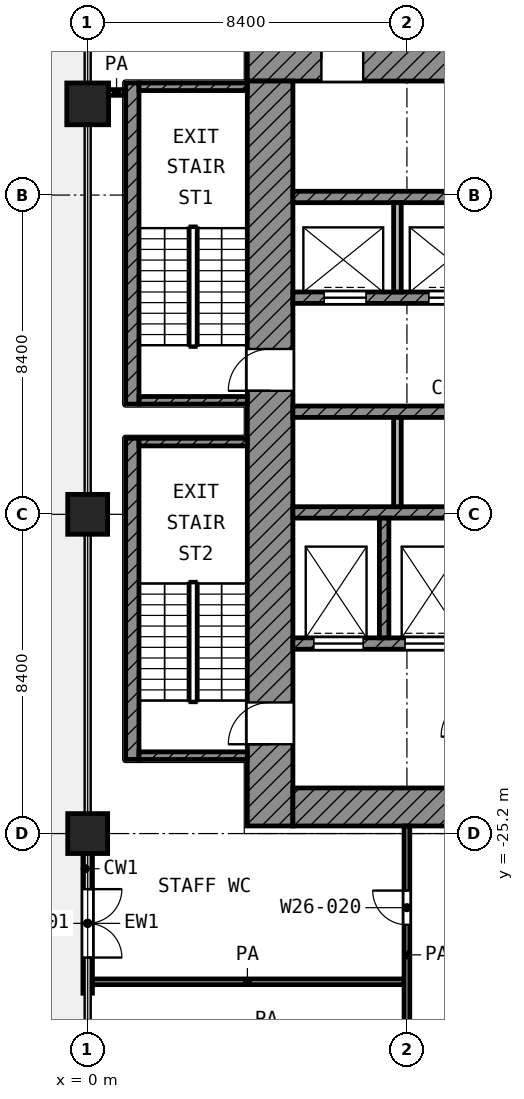
"""IFC4 building model, lengths in metres.
Left out: names, types, materials, properties, quantities, classifications, styles, units other than length and angle.
Written with IfcOpenShell. Run it as: python <this file> out.ifc"""

import sys

from ifc_helpers import new_model, si_unit, direction, frame, frame_2d, origin, origin_2d, place, context, subcontext, project, spatial, rectangle, extrude, element, fill, save


model = new_model("IFC4")
c1 = context("Model", 3, precision=1e-05, world=origin(), true_north=direction((0.0, 1.0)))
c2 = subcontext(c1, "Body", "Model", "MODEL_VIEW")
j1 = project(units=[si_unit("LENGTHUNIT", "METRE"), si_unit("PLANEANGLEUNIT", "RADIAN")], contexts=[c1])
p1 = place(None, origin())
s1 = spatial("IfcSite", under=j1, at=p1, CompositionType="ELEMENT")
p2 = place(p1, origin())
s2 = spatial("IfcBuilding", under=s1, at=p2, CompositionType="ELEMENT")
p3 = place(p2, frame((0.0, 0.0, 136.6)))
s3 = spatial("IfcBuildingStorey", under=s2, at=p3, CompositionType="ELEMENT", Elevation=136.6)
p4 = place(p3, frame((0.0, -6.0, 0.0), z_axis=(0.0, 0.0, 1.0), x_axis=(1.0, 0.0, 0.0)))
e1 = element("IfcColumn", 1, at=p4, inside=s3, PredefinedType="COLUMN", context=c2, shape_type="SweptSolid", body=[
    extrude(rectangle(XDim=1.1, YDim=1.1, at=origin_2d()), origin(), (0.0, 0.0, 1.0), 4.2),
])
for number, where, z_axis, x_axis in (
    (2, (0.0, -16.8, 0.0), (0.0, 0.0, 1.0), (1.0, 0.0, 0.0)),
    (3, (0.0, -25.2, 0.0), (0.0, 0.0, 1.0), (1.0, 0.0, 0.0)),
):
    element("IfcColumn", number, at=place(p3, frame(where, z_axis=z_axis, x_axis=x_axis)), inside=s3, PredefinedType="COLUMN", context=c2, shape_type="SweptSolid", body=[
        extrude(rectangle(XDim=1.05, YDim=1.05, at=origin_2d()), origin(), (0.0, 0.0, 1.0), 4.2),
    ])
p5 = place(p3, frame((0.0, -25.725, 0.0), z_axis=(0.0, 0.0, 1.0), x_axis=(0.0, -1.0, 0.0)))
e4 = element("IfcWall", 4, at=p5, inside=s3, PredefinedType="SOLIDWALL", context=c2, shape_type="SweptSolid", body=[
    extrude(rectangle(XDim=3.675, YDim=0.25, at=frame_2d((1.837, 0.0))), origin(), (0.0, 0.0, 1.0), 3.48),
])
p6 = place(p5, frame((0.938, 0.0, 0.0)))
e5 = element("IfcOpeningElement", 5, at=p6, cuts=e4, PredefinedType="OPENING", context=c2, shape_type="SweptSolid", body=[
    extrude(rectangle(XDim=1.8, YDim=2.1, at=frame_2d((0.9, 1.05))), frame((0.0, 0.135, 0.0), z_axis=(0.0, -1.0, 0.0), x_axis=(1.0, 0.0, 0.0)), (0.0, 0.0, 1.0), 0.27),
])
p7 = place(p3, frame((4.2, -4.8, 0.0), z_axis=(0.0, 0.0, 1.0), x_axis=(1.0, 0.0, 0.0)))
e6 = element("IfcWall", 6, at=p7, inside=s3, PredefinedType="SHEAR", context=c2, shape_type="SweptSolid", body=[
    extrude(rectangle(XDim=20.8, YDim=1.2, at=frame_2d((10.4, 0.0))), origin(), (0.0, 0.0, 1.0), 3.6),
])
p8 = place(p7, frame((1.95, 0.0, 0.0)))
e7 = element("IfcOpeningElement", 7, at=p8, cuts=e6, PredefinedType="OPENING", context=c2, shape_type="SweptSolid", body=[
    extrude(rectangle(XDim=1.1, YDim=2.1, at=frame_2d((0.55, 1.05))), frame((0.0, 0.61, 0.0), z_axis=(0.0, -1.0, 0.0), x_axis=(1.0, 0.0, 0.0)), (0.0, 0.0, 1.0), 1.22),
])
p9 = place(p7, frame((17.95, 0.0, 0.0)))
e8 = element("IfcOpeningElement", 8, at=p9, cuts=e6, PredefinedType="OPENING", context=c2, shape_type="SweptSolid", body=[
    extrude(rectangle(XDim=1.1, YDim=2.1, at=frame_2d((0.55, 1.05))), frame((0.0, 0.61, 0.0), z_axis=(0.0, -1.0, 0.0), x_axis=(1.0, 0.0, 0.0)), (0.0, 0.0, 1.0), 1.22),
])
p10 = place(p3, frame((4.8, -25.0, 0.0), z_axis=(0.0, 0.0, 1.0), x_axis=(0.0, 1.0, 0.0)))
e9 = element("IfcWall", 9, at=p10, inside=s3, PredefinedType="SHEAR", context=c2, shape_type="SweptSolid", body=[
    extrude(rectangle(XDim=19.6, YDim=1.2, at=frame_2d((9.8, 0.0))), origin(), (0.0, 0.0, 1.0), 3.6),
])
p11 = place(p10, frame((11.45, 0.0, 0.0)))
e10 = element("IfcOpeningElement", 10, at=p11, cuts=e9, PredefinedType="OPENING", context=c2, shape_type="SweptSolid", body=[
    extrude(rectangle(XDim=1.1, YDim=2.1, at=frame_2d((0.55, 1.05))), frame((0.0, 0.61, 0.0), z_axis=(0.0, -1.0, 0.0), x_axis=(1.0, 0.0, 0.0)), (0.0, 0.0, 1.0), 1.22),
])
p12 = place(p10, frame((2.15, 0.0, 0.0)))
e11 = element("IfcOpeningElement", 11, at=p12, cuts=e9, PredefinedType="OPENING", context=c2, shape_type="SweptSolid", body=[
    extrude(rectangle(XDim=1.1, YDim=2.1, at=frame_2d((0.55, 1.05))), frame((0.0, 0.61, 0.0), z_axis=(0.0, -1.0, 0.0), x_axis=(1.0, 0.0, 0.0)), (0.0, 0.0, 1.0), 1.22),
])
p13 = place(p3, frame((5.4, -24.5, 0.0), z_axis=(0.0, 0.0, 1.0), x_axis=(1.0, 0.0, 0.0)))
e12 = element("IfcWall", 12, at=p13, inside=s3, PredefinedType="SHEAR", context=c2, shape_type="SweptSolid", body=[
    extrude(rectangle(XDim=18.6, YDim=1.0, at=frame_2d((9.3, 0.0))), origin(), (0.0, 0.0, 1.0), 3.6),
])
p14 = place(p13, frame((6.3, 0.0, 0.0)))
e13 = element("IfcOpeningElement", 13, at=p14, cuts=e12, PredefinedType="OPENING", context=c2, shape_type="SweptSolid", body=[
    extrude(rectangle(XDim=1.8, YDim=2.1, at=frame_2d((0.9, 1.05))), frame((0.0, 0.51, 0.0), z_axis=(0.0, -1.0, 0.0), x_axis=(1.0, 0.0, 0.0)), (0.0, 0.0, 1.0), 1.02),
])
p15 = place(p3, frame((5.4, -8.45, 0.0), z_axis=(0.0, 0.0, 1.0), x_axis=(1.0, 0.0, 0.0)))
e14 = element("IfcWall", 14, at=p15, inside=s3, PredefinedType="SHEAR", context=c2, shape_type="SweptSolid", body=[
    extrude(rectangle(XDim=16.65, YDim=0.3, at=frame_2d((8.325, 0.0))), origin(), (0.0, 0.0, 1.0), 3.6),
])
p16 = place(p3, frame((5.4, -11.1, 0.0), z_axis=(0.0, 0.0, 1.0), x_axis=(1.0, 0.0, 0.0)))
e15 = element("IfcWall", 15, at=p16, inside=s3, PredefinedType="SHEAR", context=c2, shape_type="SweptSolid", body=[
    extrude(rectangle(XDim=16.65, YDim=0.3, at=frame_2d((8.325, 0.0))), origin(), (0.0, 0.0, 1.0), 3.6),
])
p17 = place(p16, frame((0.825, 0.0, 0.0)))
e16 = element("IfcOpeningElement", 16, at=p17, cuts=e15, PredefinedType="OPENING", context=c2, shape_type="SweptSolid", body=[
    extrude(rectangle(XDim=1.1, YDim=2.1, at=frame_2d((0.55, 1.05))), frame((0.0, 0.16, 0.0), z_axis=(0.0, -1.0, 0.0), x_axis=(1.0, 0.0, 0.0)), (0.0, 0.0, 1.0), 0.32),
])
p18 = place(p16, frame((3.575, 0.0, 0.0)))
e17 = element("IfcOpeningElement", 17, at=p18, cuts=e15, PredefinedType="OPENING", context=c2, shape_type="SweptSolid", body=[
    extrude(rectangle(XDim=1.1, YDim=2.1, at=frame_2d((0.55, 1.05))), frame((0.0, 0.16, 0.0), z_axis=(0.0, -1.0, 0.0), x_axis=(1.0, 0.0, 0.0)), (0.0, 0.0, 1.0), 0.32),
])
p19 = place(p16, frame((6.325, 0.0, 0.0)))
e18 = element("IfcOpeningElement", 18, at=p19, cuts=e15, PredefinedType="OPENING", context=c2, shape_type="SweptSolid", body=[
    extrude(rectangle(XDim=1.1, YDim=2.1, at=frame_2d((0.55, 1.05))), frame((0.0, 0.16, 0.0), z_axis=(0.0, -1.0, 0.0), x_axis=(1.0, 0.0, 0.0)), (0.0, 0.0, 1.0), 0.32),
])
p20 = place(p16, frame((9.075, 0.0, 0.0)))
e19 = element("IfcOpeningElement", 19, at=p20, cuts=e15, PredefinedType="OPENING", context=c2, shape_type="SweptSolid", body=[
    extrude(rectangle(XDim=1.1, YDim=2.1, at=frame_2d((0.55, 1.05))), frame((0.0, 0.16, 0.0), z_axis=(0.0, -1.0, 0.0), x_axis=(1.0, 0.0, 0.0)), (0.0, 0.0, 1.0), 0.32),
])
for number, where, z_axis, x_axis in (
    (20, (5.4, -14.1, 0.0), (0.0, 0.0, 1.0), (1.0, 0.0, 0.0)),
    (21, (5.4, -16.75, 0.0), (0.0, 0.0, 1.0), (1.0, 0.0, 0.0)),
):
    element("IfcWall", number, at=place(p3, frame(where, z_axis=z_axis, x_axis=x_axis)), inside=s3, PredefinedType="SHEAR", context=c2, shape_type="SweptSolid", body=[
        extrude(rectangle(XDim=16.65, YDim=0.3, at=frame_2d((8.325, 0.0))), origin(), (0.0, 0.0, 1.0), 3.6),
    ])
p21 = place(p3, frame((5.4, -20.2, 0.0), z_axis=(0.0, 0.0, 1.0), x_axis=(1.0, 0.0, 0.0)))
e22 = element("IfcWall", 22, at=p21, inside=s3, PredefinedType="SHEAR", context=c2, shape_type="SweptSolid", body=[
    extrude(rectangle(XDim=14.65, YDim=0.3, at=frame_2d((7.325, 0.0))), origin(), (0.0, 0.0, 1.0), 3.6),
])
p22 = place(p21, frame((10.55, 0.0, 0.0)))
e23 = element("IfcOpeningElement", 23, at=p22, cuts=e22, PredefinedType="OPENING", context=c2, shape_type="SweptSolid", body=[
    extrude(rectangle(XDim=1.3, YDim=2.1, at=frame_2d((0.65, 1.05))), frame((0.0, 0.16, 0.0), z_axis=(0.0, -1.0, 0.0), x_axis=(1.0, 0.0, 0.0)), (0.0, 0.0, 1.0), 0.32),
])
p23 = place(p21, frame((12.95, 0.0, 0.0)))
e24 = element("IfcOpeningElement", 24, at=p23, cuts=e22, PredefinedType="OPENING", context=c2, shape_type="SweptSolid", body=[
    extrude(rectangle(XDim=1.3, YDim=2.1, at=frame_2d((0.65, 1.05))), frame((0.0, 0.16, 0.0), z_axis=(0.0, -1.0, 0.0), x_axis=(1.0, 0.0, 0.0)), (0.0, 0.0, 1.0), 0.32),
])
p24 = place(p21, frame((0.55, 0.0, 0.0)))
e25 = element("IfcOpeningElement", 25, at=p24, cuts=e22, PredefinedType="OPENING", context=c2, shape_type="SweptSolid", body=[
    extrude(rectangle(XDim=1.3, YDim=2.1, at=frame_2d((0.65, 1.05))), frame((0.0, 0.16, 0.0), z_axis=(0.0, -1.0, 0.0), x_axis=(1.0, 0.0, 0.0)), (0.0, 0.0, 1.0), 0.32),
])
p25 = place(p21, frame((2.95, 0.0, 0.0)))
e26 = element("IfcOpeningElement", 26, at=p25, cuts=e22, PredefinedType="OPENING", context=c2, shape_type="SweptSolid", body=[
    extrude(rectangle(XDim=1.3, YDim=2.1, at=frame_2d((0.65, 1.05))), frame((0.0, 0.16, 0.0), z_axis=(0.0, -1.0, 0.0), x_axis=(1.0, 0.0, 0.0)), (0.0, 0.0, 1.0), 0.32),
])
p26 = place(p21, frame((6.55, 0.0, 0.0)))
e27 = element("IfcOpeningElement", 27, at=p26, cuts=e22, PredefinedType="OPENING", context=c2, shape_type="SweptSolid", body=[
    extrude(rectangle(XDim=0.9, YDim=2.1, at=frame_2d((0.45, 1.05))), frame((0.0, 0.16, 0.0), z_axis=(0.0, -1.0, 0.0), x_axis=(1.0, 0.0, 0.0)), (0.0, 0.0, 1.0), 0.32),
])
p27 = place(p21, frame((8.95, 0.0, 0.0)))
e28 = element("IfcOpeningElement", 28, at=p27, cuts=e22, PredefinedType="OPENING", context=c2, shape_type="SweptSolid", body=[
    extrude(rectangle(XDim=0.9, YDim=2.1, at=frame_2d((0.45, 1.05))), frame((0.0, 0.16, 0.0), z_axis=(0.0, -1.0, 0.0), x_axis=(1.0, 0.0, 0.0)), (0.0, 0.0, 1.0), 0.32),
])
p28 = place(p3, frame((7.8, -20.05, 0.0), z_axis=(0.0, 0.0, 1.0), x_axis=(0.0, 1.0, 0.0)))
e29 = element("IfcWall", 29, at=p28, inside=s3, PredefinedType="SHEAR", context=c2, shape_type="SweptSolid", body=[
    extrude(rectangle(XDim=3.15, YDim=0.25, at=frame_2d((1.575, 0.0))), origin(), (0.0, 0.0, 1.0), 3.6),
])
p29 = place(p3, frame((8.15, -10.95, 0.0), z_axis=(0.0, 0.0, 1.0), x_axis=(0.0, 1.0, 0.0)))
e30 = element("IfcWall", 30, at=p29, inside=s3, PredefinedType="PARTITIONING", context=c2, shape_type="SweptSolid", body=[
    extrude(rectangle(XDim=2.35, YDim=0.2, at=frame_2d((1.175, 0.0))), origin(), (0.0, 0.0, 1.0), 3.6),
])
p30 = place(p3, frame((8.15, -16.6, 0.0), z_axis=(0.0, 0.0, 1.0), x_axis=(0.0, 1.0, 0.0)))
e31 = element("IfcWall", 31, at=p30, inside=s3, PredefinedType="PARTITIONING", context=c2, shape_type="SweptSolid", body=[
    extrude(rectangle(XDim=2.35, YDim=0.2, at=frame_2d((1.175, 0.0))), origin(), (0.0, 0.0, 1.0), 3.6),
])
p31 = place(p3, frame((1.175, -13.9, 0.0), z_axis=(0.0, 0.0, 1.0), x_axis=(0.0, 1.0, 0.0)))
e32 = element("IfcWall", 32, at=p31, inside=s3, PredefinedType="SHEAR", context=c2, shape_type="SweptSolid", body=[
    extrude(rectangle(XDim=8.45, YDim=0.35, at=frame_2d((4.225, 0.0))), origin(), (0.0, 0.0, 1.0), 3.6),
])
for number, where, z_axis, x_axis in (
    (33, (1.35, -5.55, 0.0), (0.0, 0.0, 1.0), (1.0, 0.0, 0.0)),
    (34, (1.35, -13.8, 0.0), (0.0, 0.0, 1.0), (1.0, 0.0, 0.0)),
):
    element("IfcWall", number, at=place(p3, frame(where, z_axis=z_axis, x_axis=x_axis)), inside=s3, PredefinedType="SHEAR", context=c2, shape_type="SweptSolid", body=[
        extrude(rectangle(XDim=2.85, YDim=0.2, at=frame_2d((1.425, 0.0))), origin(), (0.0, 0.0, 1.0), 3.6),
    ])
p32 = place(p3, frame((1.175, -23.25, 0.0), z_axis=(0.0, 0.0, 1.0), x_axis=(0.0, 1.0, 0.0)))
e35 = element("IfcWall", 35, at=p32, inside=s3, PredefinedType="SHEAR", context=c2, shape_type="SweptSolid", body=[
    extrude(rectangle(XDim=8.45, YDim=0.35, at=frame_2d((4.225, 0.0))), origin(), (0.0, 0.0, 1.0), 3.6),
])
for number, where, z_axis, x_axis in (
    (36, (1.35, -14.9, 0.0), (0.0, 0.0, 1.0), (1.0, 0.0, 0.0)),
    (37, (1.35, -23.15, 0.0), (0.0, 0.0, 1.0), (1.0, 0.0, 0.0)),
):
    element("IfcWall", number, at=place(p3, frame(where, z_axis=z_axis, x_axis=x_axis)), inside=s3, PredefinedType="SHEAR", context=c2, shape_type="SweptSolid", body=[
        extrude(rectangle(XDim=2.85, YDim=0.2, at=frame_2d((1.425, 0.0))), origin(), (0.0, 0.0, 1.0), 3.6),
    ])
p33 = place(p3, frame((0.08, -29.1, 0.0), z_axis=(0.0, 0.0, 1.0), x_axis=(1.0, 0.0, 0.0)))
e38 = element("IfcWall", 38, at=p33, inside=s3, PredefinedType="PARTITIONING", context=c2, shape_type="SweptSolid", body=[
    extrude(rectangle(XDim=8.245, YDim=0.15, at=frame_2d((4.123, 0.0))), origin(), (0.0, 0.0, 1.0), 3.6),
])
p34 = place(p3, frame((0.55, -5.7, 0.0), z_axis=(0.0, 0.0, 1.0), x_axis=(1.0, 0.0, 0.0)))
e39 = element("IfcWall", 39, at=p34, inside=s3, PredefinedType="PARTITIONING", context=c2, shape_type="SweptSolid", body=[
    extrude(rectangle(XDim=0.42, YDim=0.15, at=frame_2d((0.21, 0.0))), origin(), (0.0, 0.0, 1.0), 3.6),
])
p35 = place(p3, frame((8.4, -31.782, 0.0), z_axis=(0.0, 0.0, 1.0), x_axis=(0.0, 1.0, 0.0)))
e40 = element("IfcWall", 40, at=p35, inside=s3, PredefinedType="PARTITIONING", context=c2, shape_type="SweptSolid", body=[
    extrude(rectangle(XDim=6.782, YDim=0.15, at=frame_2d((3.391, 0.0))), origin(), (0.0, 0.0, 1.0), 3.6),
])
p36 = place(p35, frame((4.182, 0.0, 0.0)))
e41 = element("IfcOpeningElement", 41, at=p36, cuts=e40, PredefinedType="OPENING", context=c2, shape_type="SweptSolid", body=[
    extrude(rectangle(XDim=0.9, YDim=2.1, at=frame_2d((0.45, 1.05))), frame((0.0, 0.085, 0.0), z_axis=(0.0, -1.0, 0.0), x_axis=(1.0, 0.0, 0.0)), (0.0, 0.0, 1.0), 0.17),
])
p37 = place(p6, origin())
e42 = element("IfcDoor", 42, at=p37, inside=s3, OperationType="DOUBLE_DOOR_SINGLE_SWING", PredefinedType="DOOR", context=c2, shape_type="SweptSolid", body=[
    extrude(rectangle(XDim=1.8, YDim=2.1, at=frame_2d((0.9, 1.05))), frame((0.0, 0.025, 0.0), z_axis=(0.0, -1.0, 0.0), x_axis=(1.0, 0.0, 0.0)), (0.0, 0.0, 1.0), 0.05),
])
fill(e5, e42)
p38 = place(p17, origin())
e43 = element("IfcDoor", 43, at=p38, inside=s3, OperationType="DOUBLE_DOOR_SLIDING", PredefinedType="DOOR", context=c2, shape_type="SweptSolid", body=[
    extrude(rectangle(XDim=1.1, YDim=2.1, at=frame_2d((0.55, 1.05))), frame((0.0, 0.025, 0.0), z_axis=(0.0, -1.0, 0.0), x_axis=(1.0, 0.0, 0.0)), (0.0, 0.0, 1.0), 0.05),
])
fill(e16, e43)
p39 = place(p18, origin())
e44 = element("IfcDoor", 44, at=p39, inside=s3, OperationType="DOUBLE_DOOR_SLIDING", PredefinedType="DOOR", context=c2, shape_type="SweptSolid", body=[
    extrude(rectangle(XDim=1.1, YDim=2.1, at=frame_2d((0.55, 1.05))), frame((0.0, 0.025, 0.0), z_axis=(0.0, -1.0, 0.0), x_axis=(1.0, 0.0, 0.0)), (0.0, 0.0, 1.0), 0.05),
])
fill(e17, e44)
p40 = place(p24, origin())
e45 = element("IfcDoor", 45, at=p40, inside=s3, OperationType="DOUBLE_DOOR_SLIDING", PredefinedType="DOOR", context=c2, shape_type="SweptSolid", body=[
    extrude(rectangle(XDim=1.3, YDim=2.1, at=frame_2d((0.65, 1.05))), frame((0.0, 0.025, 0.0), z_axis=(0.0, -1.0, 0.0), x_axis=(1.0, 0.0, 0.0)), (0.0, 0.0, 1.0), 0.05),
])
fill(e25, e45)
p41 = place(p25, origin())
e46 = element("IfcDoor", 46, at=p41, inside=s3, OperationType="DOUBLE_DOOR_SLIDING", PredefinedType="DOOR", context=c2, shape_type="SweptSolid", body=[
    extrude(rectangle(XDim=1.3, YDim=2.1, at=frame_2d((0.65, 1.05))), frame((0.0, 0.025, 0.0), z_axis=(0.0, -1.0, 0.0), x_axis=(1.0, 0.0, 0.0)), (0.0, 0.0, 1.0), 0.05),
])
fill(e26, e46)
p42 = place(p11, origin())
e47 = element("IfcDoor", 47, at=p42, inside=s3, OperationType="SINGLE_SWING_LEFT", PredefinedType="DOOR", context=c2, shape_type="SweptSolid", body=[
    extrude(rectangle(XDim=1.1, YDim=2.1, at=frame_2d((0.55, 1.05))), frame((0.0, 0.025, 0.0), z_axis=(0.0, -1.0, 0.0), x_axis=(1.0, 0.0, 0.0)), (0.0, 0.0, 1.0), 0.05),
])
fill(e10, e47)
p43 = place(p12, origin())
e48 = element("IfcDoor", 48, at=p43, inside=s3, OperationType="SINGLE_SWING_LEFT", PredefinedType="DOOR", context=c2, shape_type="SweptSolid", body=[
    extrude(rectangle(XDim=1.1, YDim=2.1, at=frame_2d((0.55, 1.05))), frame((0.0, 0.025, 0.0), z_axis=(0.0, -1.0, 0.0), x_axis=(1.0, 0.0, 0.0)), (0.0, 0.0, 1.0), 0.05),
])
fill(e11, e48)
p44 = place(p8, origin())
e49 = element("IfcDoor", 49, at=p44, inside=s3, OperationType="SINGLE_SWING_LEFT", PredefinedType="DOOR", context=c2, shape_type="SweptSolid", body=[
    extrude(rectangle(XDim=1.1, YDim=2.1, at=frame_2d((0.55, 1.05))), frame((0.0, 0.025, 0.0), z_axis=(0.0, -1.0, 0.0), x_axis=(1.0, 0.0, 0.0)), (0.0, 0.0, 1.0), 0.05),
])
fill(e7, e49)
p45 = place(p36, origin())
e50 = element("IfcDoor", 50, at=p45, inside=s3, OperationType="SINGLE_SWING_RIGHT", PredefinedType="DOOR", context=c2, shape_type="SweptSolid", body=[
    extrude(rectangle(XDim=0.9, YDim=2.1, at=frame_2d((0.45, 1.05))), frame((0.0, 0.025, 0.0), z_axis=(0.0, -1.0, 0.0), x_axis=(1.0, 0.0, 0.0)), (0.0, 0.0, 1.0), 0.05),
])
fill(e41, e50)
save(model, sys.argv[1])
